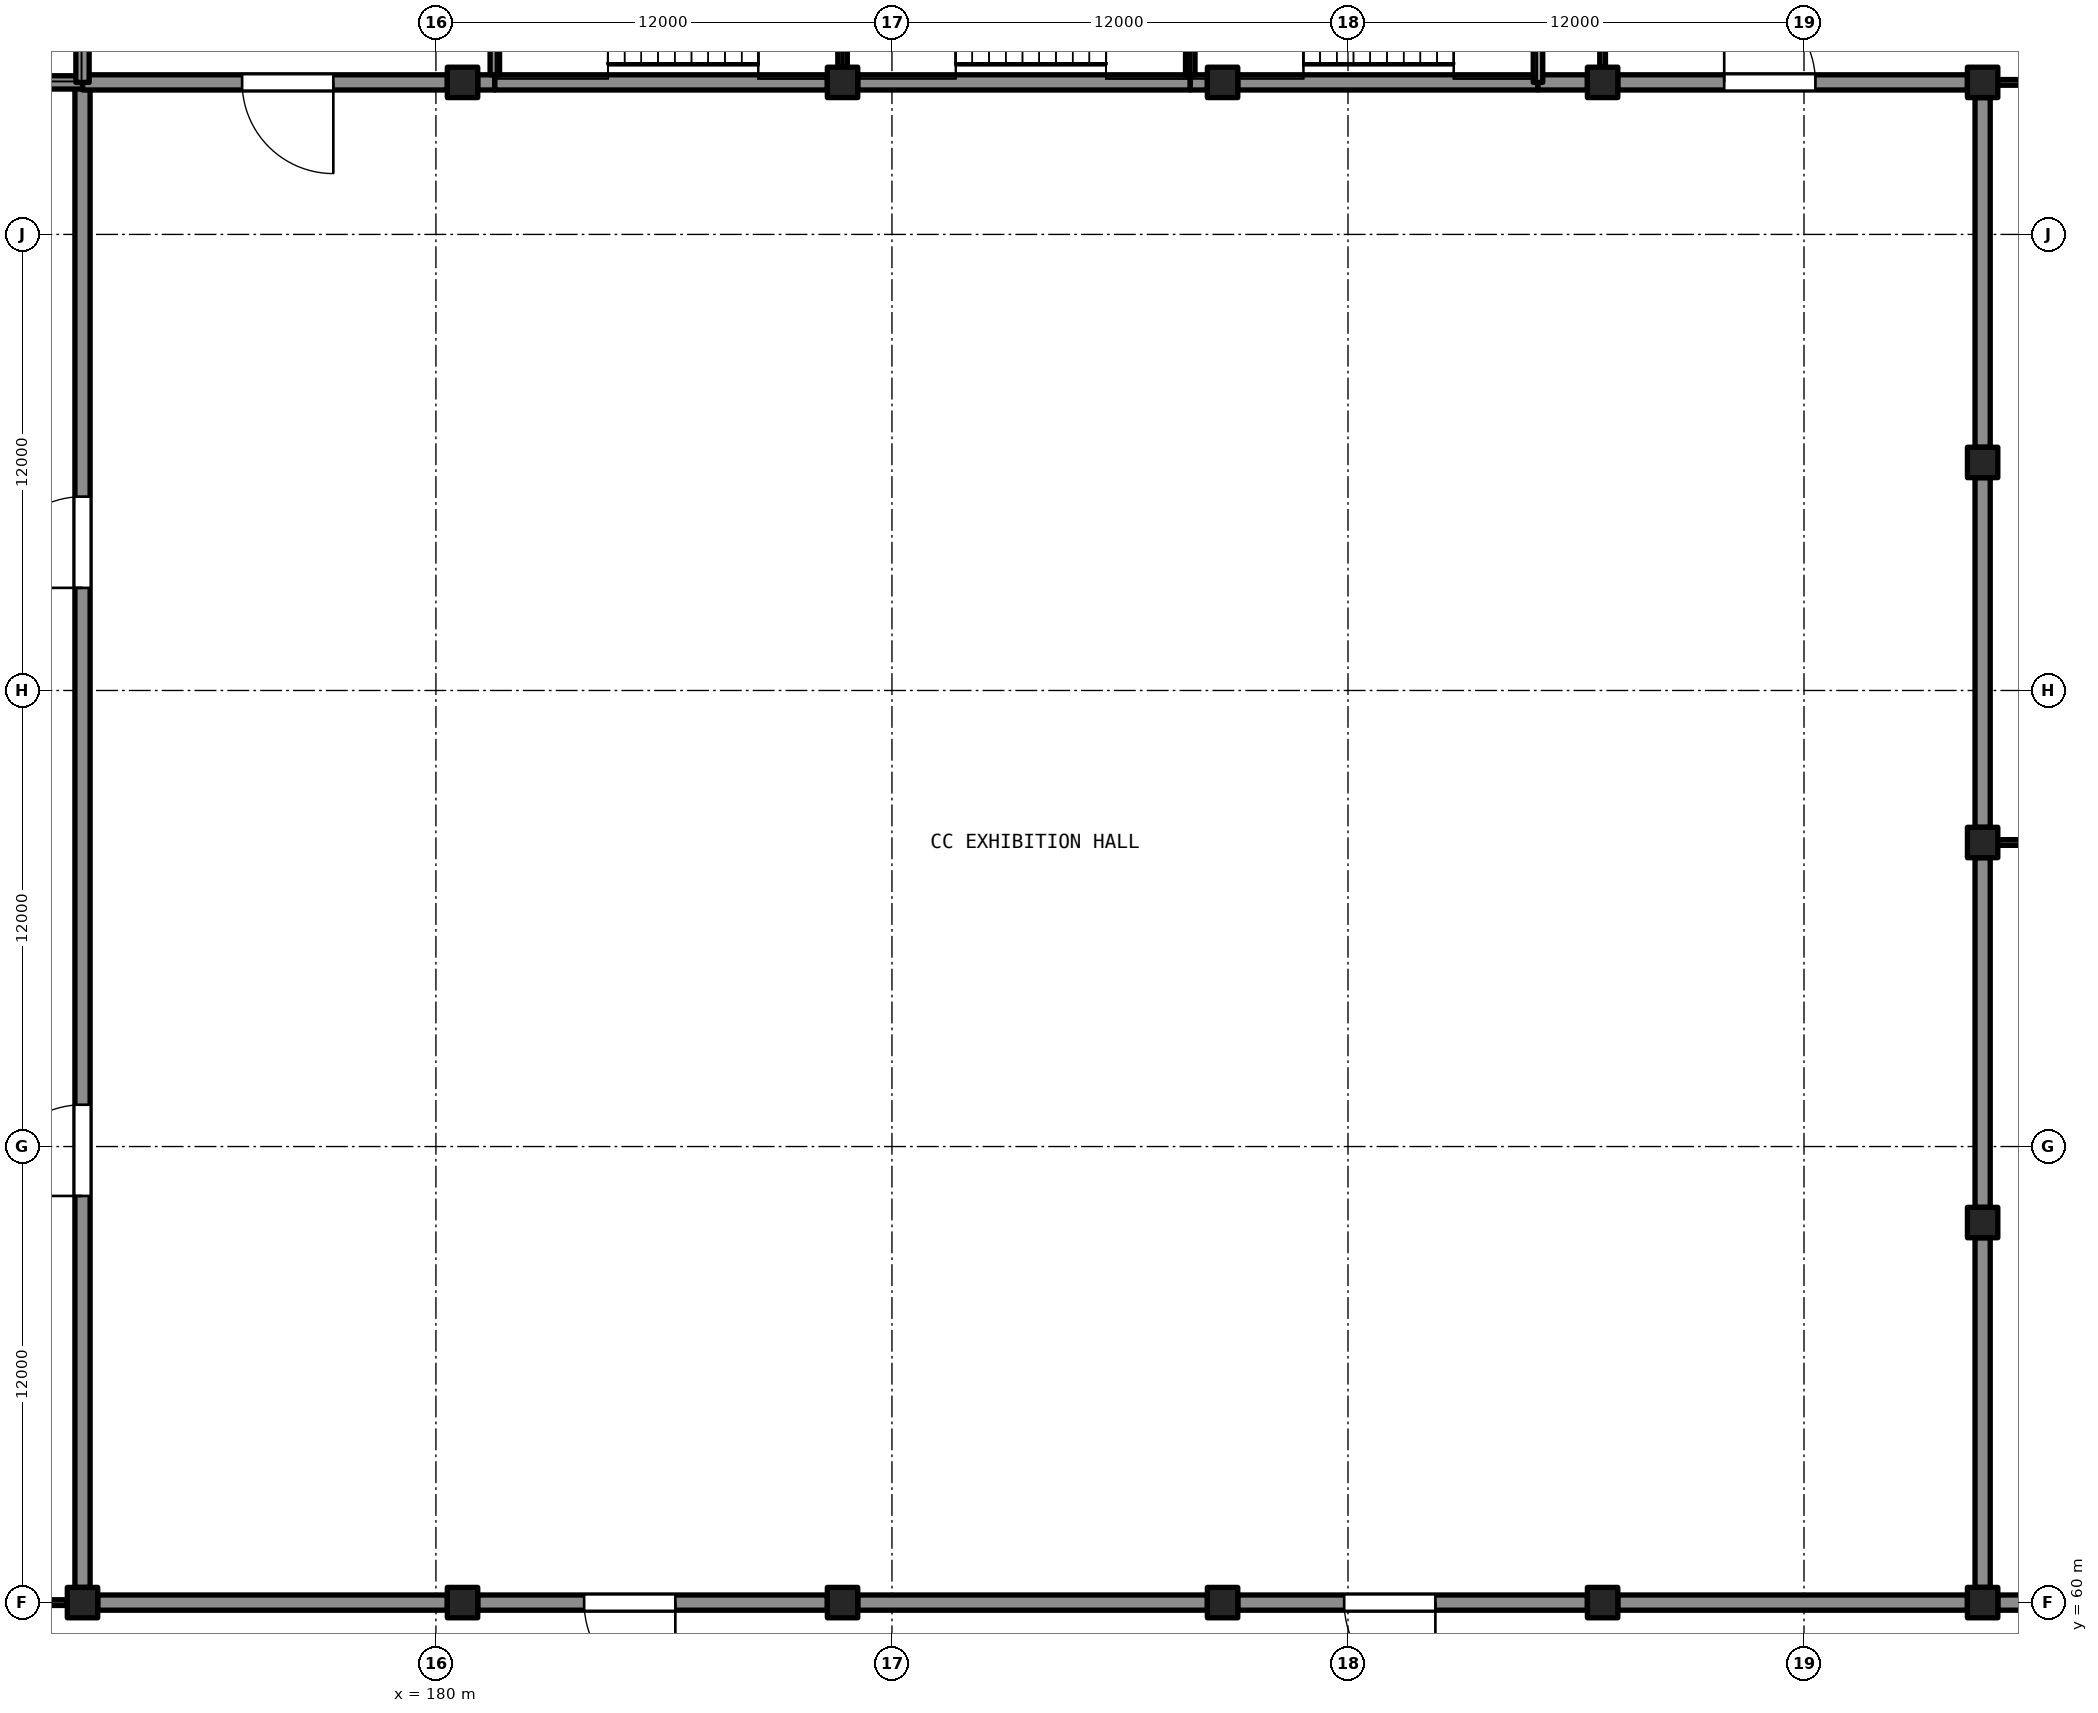
"""IFC4 building model, lengths in metres.
Left out: names, types, materials, properties, quantities, classifications, styles, units other than length and angle.
Written with IfcOpenShell. Run it as: python <this file> out.ifc"""

import sys

from ifc_helpers import new_model, si_unit, direction, frame, frame_2d, origin, origin_2d, place, context, subcontext, project, spatial, rectangle, extrude, element, fill, save


model = new_model("IFC4")
c1 = context("Model", 3, precision=1e-05, world=origin(), true_north=direction((0.0, 1.0)))
c2 = subcontext(c1, "Body", "Model", "MODEL_VIEW")
j1 = project(units=[si_unit("LENGTHUNIT", "METRE"), si_unit("PLANEANGLEUNIT", "RADIAN")], contexts=[c1])
p1 = place(None, origin())
s1 = spatial("IfcSite", under=j1, at=p1, CompositionType="ELEMENT")
p2 = place(p1, origin())
s2 = spatial("IfcBuilding", under=s1, at=p2, CompositionType="ELEMENT")
p3 = place(p2, origin())
s3 = spatial("IfcBuildingStorey", under=s2, at=p3, CompositionType="ELEMENT", Elevation=0.0)
for number, where, z_axis, x_axis in (
    (1, (170.7, 60.0, -1.2), (0.0, 0.0, 1.0), (1.0, 0.0, 0.0)),
    (2, (180.7, 60.0, -1.2), (0.0, 0.0, 1.0), (1.0, 0.0, 0.0)),
    (3, (180.7, 100.0, -1.2), (0.0, 0.0, 1.0), (1.0, 0.0, 0.0)),
    (4, (190.7, 60.0, -1.2), (0.0, 0.0, 1.0), (1.0, 0.0, 0.0)),
    (5, (190.7, 100.0, -1.2), (0.0, 0.0, 1.0), (1.0, 0.0, 0.0)),
    (6, (200.7, 60.0, -1.2), (0.0, 0.0, 1.0), (1.0, 0.0, 0.0)),
    (7, (200.7, 100.0, -1.2), (0.0, 0.0, 1.0), (1.0, 0.0, 0.0)),
    (8, (210.7, 60.0, -1.2), (0.0, 0.0, 1.0), (1.0, 0.0, 0.0)),
    (9, (210.7, 100.0, -1.2), (0.0, 0.0, 1.0), (1.0, 0.0, 0.0)),
    (10, (220.7, 60.0, -1.2), (0.0, 0.0, 1.0), (1.0, 0.0, 0.0)),
    (11, (220.7, 70.0, -1.2), (0.0, 0.0, 1.0), (1.0, 0.0, 0.0)),
    (12, (220.7, 80.0, -1.2), (0.0, 0.0, 1.0), (1.0, 0.0, 0.0)),
    (13, (220.7, 90.0, -1.2), (0.0, 0.0, 1.0), (1.0, 0.0, 0.0)),
    (14, (220.7, 100.0, -1.2), (0.0, 0.0, 1.0), (1.0, 0.0, 0.0)),
):
    element("IfcColumn", number, at=place(p3, frame(where, z_axis=z_axis, x_axis=x_axis)), inside=s3, PredefinedType="COLUMN", context=c2, shape_type="SweptSolid", body=[
        extrude(rectangle(XDim=0.8, YDim=0.8, at=origin_2d()), origin(), (0.0, 0.0, 1.0), 10.2),
    ])
p4 = place(p3, frame((170.7, 60.4, 0.0), z_axis=(0.0, 0.0, 1.0), x_axis=(0.0, 1.0, 0.0)))
e15 = element("IfcWall", 15, at=p4, inside=s3, PredefinedType="SHEAR", context=c2, shape_type="SweptSolid", body=[
    extrude(rectangle(XDim=39.6, YDim=0.4, at=frame_2d((19.8, 0.0))), origin(), (0.0, 0.0, 1.0), 9.0),
])
p5 = place(p4, frame((10.3, 0.0, 0.0)))
e16 = element("IfcOpeningElement", 16, at=p5, cuts=e15, PredefinedType="OPENING", context=c2, shape_type="SweptSolid", body=[
    extrude(rectangle(XDim=2.4, YDim=2.4, at=frame_2d((1.2, 1.2))), frame((0.0, 0.21, 0.0), z_axis=(0.0, -1.0, 0.0), x_axis=(1.0, 0.0, 0.0)), (0.0, 0.0, 1.0), 0.421),
])
p6 = place(p4, frame((26.3, 0.0, 0.0)))
e17 = element("IfcOpeningElement", 17, at=p6, cuts=e15, PredefinedType="OPENING", context=c2, shape_type="SweptSolid", body=[
    extrude(rectangle(XDim=2.4, YDim=2.4, at=frame_2d((1.2, 1.2))), frame((0.0, 0.21, 0.0), z_axis=(0.0, -1.0, 0.0), x_axis=(1.0, 0.0, 0.0)), (0.0, 0.0, 1.0), 0.421),
])
p7 = place(p3, frame((171.1, 60.0, 0.0), z_axis=(0.0, 0.0, 1.0), x_axis=(1.0, 0.0, 0.0)))
e18 = element("IfcWall", 18, at=p7, inside=s3, PredefinedType="SHEAR", context=c2, shape_type="SweptSolid", body=[
    extrude(rectangle(XDim=9.2, YDim=0.4, at=frame_2d((4.6, 0.0))), origin(), (0.0, 0.0, 1.0), 9.0),
])
p8 = place(p3, frame((190.3, 60.0, 0.0), z_axis=(0.0, 0.0, 1.0), x_axis=(-1.0, 0.0, 0.0)))
e19 = element("IfcWall", 19, at=p8, inside=s3, PredefinedType="SHEAR", context=c2, shape_type="SweptSolid", body=[
    extrude(rectangle(XDim=9.2, YDim=0.4, at=frame_2d((4.6, 0.0))), origin(), (0.0, 0.0, 1.0), 9.0),
])
p9 = place(p8, frame((4.0, 0.0, 0.0)))
e20 = element("IfcOpeningElement", 20, at=p9, cuts=e19, PredefinedType="OPENING", context=c2, shape_type="SweptSolid", body=[
    extrude(rectangle(XDim=2.4, YDim=2.4, at=frame_2d((1.2, 1.2))), frame((0.0, 0.21, 0.0), z_axis=(0.0, -1.0, 0.0), x_axis=(1.0, 0.0, 0.0)), (0.0, 0.0, 1.0), 0.421),
])
p10 = place(p3, frame((191.1, 60.0, 0.0), z_axis=(0.0, 0.0, 1.0), x_axis=(1.0, 0.0, 0.0)))
e21 = element("IfcWall", 21, at=p10, inside=s3, PredefinedType="SHEAR", context=c2, shape_type="SweptSolid", body=[
    extrude(rectangle(XDim=9.2, YDim=0.4, at=frame_2d((4.6, 0.0))), origin(), (0.0, 0.0, 1.0), 9.0),
])
p11 = place(p3, frame((210.3, 60.0, 0.0), z_axis=(0.0, 0.0, 1.0), x_axis=(-1.0, 0.0, 0.0)))
e22 = element("IfcWall", 22, at=p11, inside=s3, PredefinedType="SHEAR", context=c2, shape_type="SweptSolid", body=[
    extrude(rectangle(XDim=9.2, YDim=0.4, at=frame_2d((4.6, 0.0))), origin(), (0.0, 0.0, 1.0), 9.0),
])
p12 = place(p11, frame((4.0, 0.0, 0.0)))
e23 = element("IfcOpeningElement", 23, at=p12, cuts=e22, PredefinedType="OPENING", context=c2, shape_type="SweptSolid", body=[
    extrude(rectangle(XDim=2.4, YDim=2.4, at=frame_2d((1.2, 1.2))), frame((0.0, 0.21, 0.0), z_axis=(0.0, -1.0, 0.0), x_axis=(1.0, 0.0, 0.0)), (0.0, 0.0, 1.0), 0.421),
])
p13 = place(p3, frame((211.1, 60.0, 0.0), z_axis=(0.0, 0.0, 1.0), x_axis=(1.0, 0.0, 0.0)))
e24 = element("IfcWall", 24, at=p13, inside=s3, PredefinedType="SHEAR", context=c2, shape_type="SweptSolid", body=[
    extrude(rectangle(XDim=9.2, YDim=0.4, at=frame_2d((4.6, 0.0))), origin(), (0.0, 0.0, 1.0), 9.0),
])
p14 = place(p3, frame((180.3, 100.0, 0.0), z_axis=(0.0, 0.0, 1.0), x_axis=(-1.0, 0.0, 0.0)))
e25 = element("IfcWall", 25, at=p14, inside=s3, PredefinedType="SHEAR", context=c2, shape_type="SweptSolid", body=[
    extrude(rectangle(XDim=9.6, YDim=0.4, at=frame_2d((4.8, 0.0))), origin(), (0.0, 0.0, 1.0), 9.0),
])
p15 = place(p14, frame((3.0, 0.0, 0.0)))
e26 = element("IfcOpeningElement", 26, at=p15, cuts=e25, PredefinedType="OPENING", context=c2, shape_type="SweptSolid", body=[
    extrude(rectangle(XDim=2.4, YDim=2.4, at=frame_2d((1.2, 1.2))), frame((0.0, 0.21, 0.0), z_axis=(0.0, -1.0, 0.0), x_axis=(1.0, 0.0, 0.0)), (0.0, 0.0, 1.0), 0.421),
])
p16 = place(p3, frame((181.1, 100.0, 0.0), z_axis=(0.0, 0.0, 1.0), x_axis=(1.0, 0.0, 0.0)))
e27 = element("IfcWall", 27, at=p16, inside=s3, PredefinedType="SHEAR", context=c2, shape_type="SweptSolid", body=[
    extrude(rectangle(XDim=0.45, YDim=0.4, at=frame_2d((0.225, 0.0))), origin(), (0.0, 0.0, 1.0), 9.0),
])
for number, where, z_axis, x_axis in (
    (28, (181.55, 100.0, 0.0), (0.0, 0.0, 1.0), (1.0, 0.0, 0.0)),
    (29, (191.1, 100.0, 0.0), (0.0, 0.0, 1.0), (1.0, 0.0, 0.0)),
):
    element("IfcWall", number, at=place(p3, frame(where, z_axis=z_axis, x_axis=x_axis)), inside=s3, PredefinedType="SHEAR", context=c2, shape_type="SweptSolid", body=[
        extrude(rectangle(XDim=8.75, YDim=0.4, at=frame_2d((4.375, 0.0))), origin(), (0.0, 0.0, 1.0), 9.0),
    ])
p17 = place(p3, frame((199.85, 100.0, 0.0), z_axis=(0.0, 0.0, 1.0), x_axis=(1.0, 0.0, 0.0)))
e30 = element("IfcWall", 30, at=p17, inside=s3, PredefinedType="SHEAR", context=c2, shape_type="SweptSolid", body=[
    extrude(rectangle(XDim=0.45, YDim=0.4, at=frame_2d((0.225, 0.0))), origin(), (0.0, 0.0, 1.0), 9.0),
])
p18 = place(p3, frame((201.1, 100.0, 0.0), z_axis=(0.0, 0.0, 1.0), x_axis=(1.0, 0.0, 0.0)))
e31 = element("IfcWall", 31, at=p18, inside=s3, PredefinedType="SHEAR", context=c2, shape_type="SweptSolid", body=[
    extrude(rectangle(XDim=7.9, YDim=0.4, at=frame_2d((3.95, 0.0))), origin(), (0.0, 0.0, 1.0), 9.0),
])
p19 = place(p3, frame((209.0, 100.0, 0.0), z_axis=(0.0, 0.0, 1.0), x_axis=(1.0, 0.0, 0.0)))
e32 = element("IfcWall", 32, at=p19, inside=s3, PredefinedType="SHEAR", context=c2, shape_type="SweptSolid", body=[
    extrude(rectangle(XDim=1.3, YDim=0.4, at=frame_2d((0.65, 0.0))), origin(), (0.0, 0.0, 1.0), 9.0),
])
p20 = place(p3, frame((211.1, 100.0, 0.0), z_axis=(0.0, 0.0, 1.0), x_axis=(1.0, 0.0, 0.0)))
e33 = element("IfcWall", 33, at=p20, inside=s3, PredefinedType="SHEAR", context=c2, shape_type="SweptSolid", body=[
    extrude(rectangle(XDim=9.2, YDim=0.4, at=frame_2d((4.6, 0.0))), origin(), (0.0, 0.0, 1.0), 9.0),
])
p21 = place(p20, frame((2.8, 0.0, 0.0)))
e34 = element("IfcOpeningElement", 34, at=p21, cuts=e33, PredefinedType="OPENING", context=c2, shape_type="SweptSolid", body=[
    extrude(rectangle(XDim=2.4, YDim=2.4, at=frame_2d((1.2, 1.2))), frame((0.0, 0.21, 0.0), z_axis=(0.0, -1.0, 0.0), x_axis=(1.0, 0.0, 0.0)), (0.0, 0.0, 1.0), 0.421),
])
for number, where, z_axis, x_axis in (
    (35, (220.7, 60.4, 0.0), (0.0, 0.0, 1.0), (0.0, 1.0, 0.0)),
    (36, (220.7, 70.4, 0.0), (0.0, 0.0, 1.0), (0.0, 1.0, 0.0)),
    (37, (220.7, 80.4, 0.0), (0.0, 0.0, 1.0), (0.0, 1.0, 0.0)),
    (38, (220.7, 90.4, 0.0), (0.0, 0.0, 1.0), (0.0, 1.0, 0.0)),
):
    element("IfcWall", number, at=place(p3, frame(where, z_axis=z_axis, x_axis=x_axis)), inside=s3, PredefinedType="SHEAR", context=c2, shape_type="SweptSolid", body=[
        extrude(rectangle(XDim=9.2, YDim=0.4, at=frame_2d((4.6, 0.0))), origin(), (0.0, 0.0, 1.0), 9.0),
    ])
p22 = place(p3, frame((221.1, 60.0, 0.0), z_axis=(0.0, 0.0, 1.0), x_axis=(1.0, 0.0, 0.0)))
e39 = element("IfcWall", 39, at=p22, inside=s3, PredefinedType="SHEAR", context=c2, shape_type="SweptSolid", body=[
    extrude(rectangle(XDim=9.6, YDim=0.4, at=frame_2d((4.8, 0.0))), origin(), (0.0, 0.0, 1.0), 9.0),
])
p23 = place(p3, frame((163.0, 100.0, 0.0), z_axis=(0.0, 0.0, 1.0), x_axis=(1.0, 0.0, 0.0)))
e40 = element("IfcWall", 40, at=p23, inside=s3, PredefinedType="SHEAR", context=c2, shape_type="SweptSolid", body=[
    extrude(rectangle(XDim=7.7, YDim=0.35, at=frame_2d((3.85, 0.0))), origin(), (0.0, 0.0, 1.0), 8.59),
])
p24 = place(p3, frame((170.7, 100.0, 0.0), z_axis=(0.0, 0.0, 1.0), x_axis=(0.0, 1.0, 0.0)))
e41 = element("IfcWall", 41, at=p24, inside=s3, PredefinedType="SHEAR", context=c2, shape_type="SweptSolid", body=[
    extrude(rectangle(XDim=3.15, YDim=0.35, at=frame_2d((1.575, 0.0))), origin(), (0.0, 0.0, 1.0), 8.59),
])
p25 = place(p3, frame((221.1, 80.0, 0.0), z_axis=(0.0, 0.0, 1.0), x_axis=(1.0, 0.0, 0.0)))
e42 = element("IfcWall", 42, at=p25, inside=s3, PredefinedType="PARTITIONING", context=c2, shape_type="SweptSolid", body=[
    extrude(rectangle(XDim=9.2, YDim=0.15, at=frame_2d((4.6, 0.0))), origin(), (0.0, 0.0, 1.0), 8.54),
])
p26 = place(p3, frame((221.1, 100.0, 0.0), z_axis=(0.0, 0.0, 1.0), x_axis=(1.0, 0.0, 0.0)))
e43 = element("IfcWall", 43, at=p26, inside=s3, PredefinedType="PARTITIONING", context=c2, shape_type="SweptSolid", body=[
    extrude(rectangle(XDim=9.2, YDim=0.15, at=frame_2d((4.6, 0.0))), origin(), (0.0, 0.0, 1.0), 8.54),
])
p27 = place(p26, frame((6.05, 0.0, 0.0)))
e44 = element("IfcOpeningElement", 44, at=p27, cuts=e43, PredefinedType="OPENING", context=c2, shape_type="SweptSolid", body=[
    extrude(rectangle(XDim=1.8, YDim=2.1, at=frame_2d((0.9, 1.05))), frame((0.0, 0.085, 0.0), z_axis=(0.0, -1.0, 0.0), x_axis=(1.0, 0.0, 0.0)), (0.0, 0.0, 1.0), 0.171),
])
p28 = place(p3, frame((170.3, 60.0, 0.0), z_axis=(0.0, 0.0, 1.0), x_axis=(-1.0, 0.0, 0.0)))
e45 = element("IfcWall", 45, at=p28, inside=s3, PredefinedType="PARTITIONING", context=c2, shape_type="SweptSolid", body=[
    extrude(rectangle(XDim=9.2, YDim=0.15, at=frame_2d((4.6, 0.0))), origin(), (0.0, 0.0, 1.0), 8.59),
])
p29 = place(p28, frame((6.15, 0.0, 0.0)))
e46 = element("IfcOpeningElement", 46, at=p29, cuts=e45, PredefinedType="OPENING", context=c2, shape_type="SweptSolid", body=[
    extrude(rectangle(XDim=1.8, YDim=2.1, at=frame_2d((0.9, 1.05))), frame((0.0, 0.085, 0.0), z_axis=(0.0, -1.0, 0.0), x_axis=(1.0, 0.0, 0.0)), (0.0, 0.0, 1.0), 0.171),
])
p30 = place(p3, frame((181.55, 100.2, 0.0), z_axis=(0.0, 0.0, 1.0), x_axis=(0.0, 1.0, 0.0)))
e47 = element("IfcWall", 47, at=p30, inside=s3, PredefinedType="SHEAR", context=c2, shape_type="SweptSolid", body=[
    extrude(rectangle(XDim=4.525, YDim=0.25, at=frame_2d((2.263, 0.0))), origin(), (0.0, 0.0, 1.0), 8.59),
])
p31 = place(p3, frame((190.7, 100.4, 0.0), z_axis=(0.0, 0.0, 1.0), x_axis=(0.0, 1.0, 0.0)))
e48 = element("IfcWall", 48, at=p31, inside=s3, PredefinedType="SHEAR", context=c2, shape_type="SweptSolid", body=[
    extrude(rectangle(XDim=4.325, YDim=0.25, at=frame_2d((2.163, 0.0))), origin(), (0.0, 0.0, 1.0), 8.59),
])
p32 = place(p3, frame((199.85, 100.2, 0.0), z_axis=(0.0, 0.0, 1.0), x_axis=(0.0, 1.0, 0.0)))
e49 = element("IfcWall", 49, at=p32, inside=s3, PredefinedType="SHEAR", context=c2, shape_type="SweptSolid", body=[
    extrude(rectangle(XDim=4.525, YDim=0.25, at=frame_2d((2.263, 0.0))), origin(), (0.0, 0.0, 1.0), 8.59),
])
p33 = place(p3, frame((209.0, 100.0, 0.0), z_axis=(0.0, 0.0, 1.0), x_axis=(0.0, 1.0, 0.0)))
e50 = element("IfcWall", 50, at=p33, inside=s3, PredefinedType="SHEAR", context=c2, shape_type="SweptSolid", body=[
    extrude(rectangle(XDim=4.725, YDim=0.25, at=frame_2d((2.363, 0.0))), origin(), (0.0, 0.0, 1.0), 8.59),
])
p34 = place(p3, frame((210.7, 109.6, 0.0), z_axis=(0.0, 0.0, 1.0), x_axis=(0.0, -1.0, 0.0)))
e51 = element("IfcWall", 51, at=p34, inside=s3, PredefinedType="PARTITIONING", context=c2, shape_type="SweptSolid", body=[
    extrude(rectangle(XDim=9.2, YDim=0.15, at=frame_2d((4.6, 0.0))), origin(), (0.0, 0.0, 1.0), 8.59),
])
p35 = place(p34, frame((6.9, 0.0, 0.0)))
e52 = element("IfcOpeningElement", 52, at=p35, cuts=e51, PredefinedType="OPENING", context=c2, shape_type="SweptSolid", body=[
    extrude(rectangle(XDim=1.0, YDim=2.1, at=frame_2d((0.5, 1.05))), frame((0.0, 0.085, 0.0), z_axis=(0.0, -1.0, 0.0), x_axis=(1.0, 0.0, 0.0)), (0.0, 0.0, 1.0), 0.171),
])
p36 = place(p5, origin())
e53 = element("IfcDoor", 53, at=p36, inside=s3, OperationType="DOUBLE_DOOR_SINGLE_SWING", PredefinedType="DOOR", context=c2, shape_type="SweptSolid", body=[
    extrude(rectangle(XDim=2.4, YDim=2.4, at=frame_2d((1.2, 1.2))), frame((0.0, 0.025, 0.0), z_axis=(0.0, -1.0, 0.0), x_axis=(1.0, 0.0, 0.0)), (0.0, 0.0, 1.0), 0.05),
])
fill(e16, e53)
p37 = place(p6, origin())
e54 = element("IfcDoor", 54, at=p37, inside=s3, OperationType="DOUBLE_DOOR_SINGLE_SWING", PredefinedType="DOOR", context=c2, shape_type="SweptSolid", body=[
    extrude(rectangle(XDim=2.4, YDim=2.4, at=frame_2d((1.2, 1.2))), frame((0.0, 0.025, 0.0), z_axis=(0.0, -1.0, 0.0), x_axis=(1.0, 0.0, 0.0)), (0.0, 0.0, 1.0), 0.05),
])
fill(e17, e54)
p38 = place(p9, origin())
e55 = element("IfcDoor", 55, at=p38, inside=s3, OperationType="DOUBLE_DOOR_SINGLE_SWING", PredefinedType="DOOR", context=c2, shape_type="SweptSolid", body=[
    extrude(rectangle(XDim=2.4, YDim=2.4, at=frame_2d((1.2, 1.2))), frame((0.0, 0.025, 0.0), z_axis=(0.0, -1.0, 0.0), x_axis=(1.0, 0.0, 0.0)), (0.0, 0.0, 1.0), 0.05),
])
fill(e20, e55)
p39 = place(p12, origin())
e56 = element("IfcDoor", 56, at=p39, inside=s3, OperationType="DOUBLE_DOOR_SINGLE_SWING", PredefinedType="DOOR", context=c2, shape_type="SweptSolid", body=[
    extrude(rectangle(XDim=2.4, YDim=2.4, at=frame_2d((1.2, 1.2))), frame((0.0, 0.025, 0.0), z_axis=(0.0, -1.0, 0.0), x_axis=(1.0, 0.0, 0.0)), (0.0, 0.0, 1.0), 0.05),
])
fill(e23, e56)
p40 = place(p21, origin())
e57 = element("IfcDoor", 57, at=p40, inside=s3, OperationType="DOUBLE_DOOR_SINGLE_SWING", PredefinedType="DOOR", context=c2, shape_type="SweptSolid", body=[
    extrude(rectangle(XDim=2.4, YDim=2.4, at=frame_2d((1.2, 1.2))), frame((0.0, 0.025, 0.0), z_axis=(0.0, -1.0, 0.0), x_axis=(1.0, 0.0, 0.0)), (0.0, 0.0, 1.0), 0.05),
])
fill(e34, e57)
p41 = place(p15, origin())
e58 = element("IfcDoor", 58, at=p41, inside=s3, OperationType="DOUBLE_DOOR_SINGLE_SWING", PredefinedType="DOOR", context=c2, shape_type="SweptSolid", body=[
    extrude(rectangle(XDim=2.4, YDim=2.4, at=frame_2d((1.2, 1.2))), frame((0.0, 0.025, 0.0), z_axis=(0.0, -1.0, 0.0), x_axis=(1.0, 0.0, 0.0)), (0.0, 0.0, 1.0), 0.05),
])
fill(e26, e58)
save(model, sys.argv[1])
